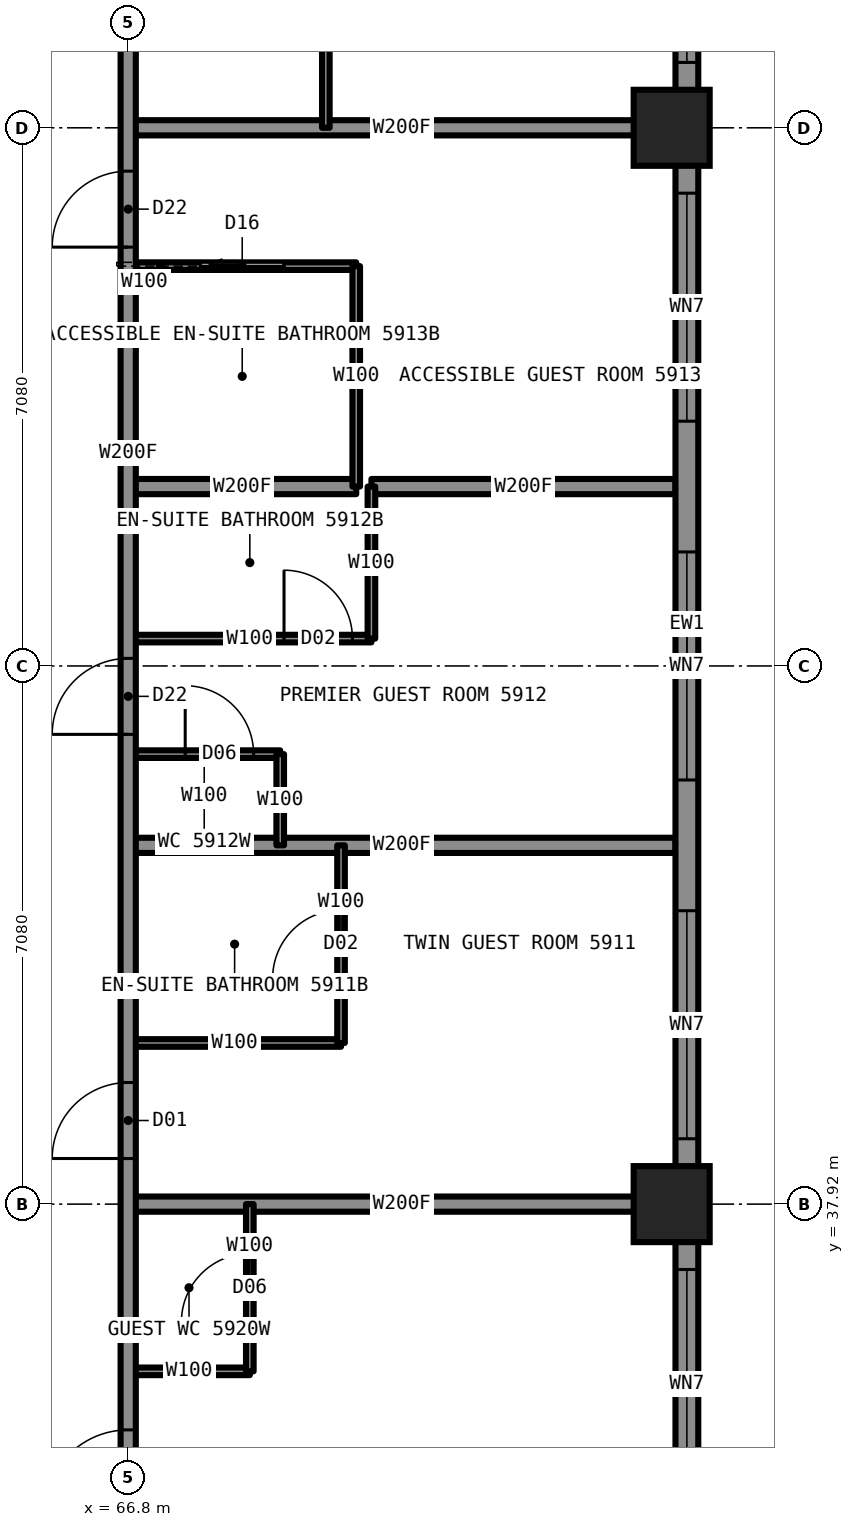
"""IFC4 building model, lengths in metres.
Left out: names, types, materials, properties, quantities, classifications, styles, units other than length and angle.
Written with IfcOpenShell. Run it as: python <this file> out.ifc"""

import sys

from ifc_helpers import new_model, si_unit, direction, frame, frame_2d, origin, origin_2d, place, context, subcontext, project, spatial, rectangle, i_section, extrude, element, fill, save


model = new_model("IFC4")
c1 = context("Model", 3, precision=1e-05, world=origin(), true_north=direction((0.0, 1.0)))
c2 = subcontext(c1, "Body", "Model", "MODEL_VIEW")
j1 = project(units=[si_unit("LENGTHUNIT", "METRE"), si_unit("PLANEANGLEUNIT", "RADIAN")], contexts=[c1])
p1 = place(None, origin())
s1 = spatial("IfcSite", under=j1, at=p1, CompositionType="ELEMENT")
p2 = place(p1, origin())
s2 = spatial("IfcBuilding", under=s1, at=p2, CompositionType="ELEMENT")
p3 = place(p2, frame((0.0, 0.0, 214.3)))
s3 = spatial("IfcBuildingStorey", under=s2, at=p3, CompositionType="ELEMENT", Elevation=214.3)
for number, where, z_axis, x_axis in (
    (1, (73.95, 37.92, 0.0), (0.0, 0.0, 1.0), (1.0, 0.0, 0.0)),
    (2, (73.95, 52.08, 0.0), (0.0, 0.0, 1.0), (1.0, 0.0, 0.0)),
):
    element("IfcColumn", number, at=place(p3, frame(where, z_axis=z_axis, x_axis=x_axis)), inside=s3, PredefinedType="COLUMN", context=c2, shape_type="SweptSolid", body=[
        extrude(i_section(OverallWidth=0.411, OverallDepth=0.434, WebThickness=0.036, FlangeThickness=0.057, at=origin_2d()), origin(), (0.0, 0.0, 1.0), 3.5),
    ])
p4 = place(p3, frame((66.8, 43.84, 0.0), z_axis=(0.0, 0.0, 1.0), x_axis=(1.0, 0.0, 0.0)))
e3 = element("IfcWall", 3, at=p4, inside=s3, PredefinedType="PARTITIONING", context=c2, shape_type="SweptSolid", body=[
    extrude(rectangle(XDim=2.0, YDim=0.1, at=frame_2d((1.0, 0.0))), origin(), (0.0, 0.0, 1.0), 3.33),
])
p5 = place(p4, frame((0.75, 0.0, 0.0)))
e4 = element("IfcOpeningElement", 4, at=p5, cuts=e3, PredefinedType="OPENING", context=c2, shape_type="SweptSolid", body=[
    extrude(rectangle(XDim=0.9, YDim=2.1, at=frame_2d((0.45, 1.05))), frame((0.0, 0.06, 0.0), z_axis=(0.0, -1.0, 0.0), x_axis=(1.0, 0.0, 0.0)), (0.0, 0.0, 1.0), 0.12),
])
p6 = place(p3, frame((66.8, 42.64, 0.0), z_axis=(0.0, 0.0, 1.0), x_axis=(1.0, 0.0, 0.0)))
e5 = element("IfcWall", 5, at=p6, inside=s3, PredefinedType="PARTITIONING", context=c2, shape_type="SweptSolid", body=[
    extrude(rectangle(XDim=7.2, YDim=0.2, at=frame_2d((3.6, 0.0))), origin(), (0.0, 0.0, 1.0), 2.73),
])
p7 = place(p3, frame((66.8, 40.04, 0.0), z_axis=(0.0, 0.0, 1.0), x_axis=(1.0, 0.0, 0.0)))
e6 = element("IfcWall", 6, at=p7, inside=s3, PredefinedType="PARTITIONING", context=c2, shape_type="SweptSolid", body=[
    extrude(rectangle(XDim=2.8, YDim=0.1, at=frame_2d((1.4, 0.0))), origin(), (0.0, 0.0, 1.0), 3.33),
])
p8 = place(p3, frame((66.8, 37.92, 0.0), z_axis=(0.0, 0.0, 1.0), x_axis=(1.0, 0.0, 0.0)))
e7 = element("IfcWall", 7, at=p8, inside=s3, PredefinedType="PARTITIONING", context=c2, shape_type="SweptSolid", body=[
    extrude(rectangle(XDim=7.2, YDim=0.2, at=frame_2d((3.6, 0.0))), origin(), (0.0, 0.0, 1.0), 2.573),
])
p9 = place(p3, frame((66.8, 35.72, 0.0), z_axis=(0.0, 0.0, 1.0), x_axis=(1.0, 0.0, 0.0)))
e8 = element("IfcWall", 8, at=p9, inside=s3, PredefinedType="PARTITIONING", context=c2, shape_type="SweptSolid", body=[
    extrude(rectangle(XDim=1.6, YDim=0.1, at=frame_2d((0.8, 0.0))), origin(), (0.0, 0.0, 1.0), 3.33),
])
p10 = place(p3, frame((66.8, 45.36, 0.0), z_axis=(0.0, 0.0, 1.0), x_axis=(1.0, 0.0, 0.0)))
e9 = element("IfcWall", 9, at=p10, inside=s3, PredefinedType="PARTITIONING", context=c2, shape_type="SweptSolid", body=[
    extrude(rectangle(XDim=3.2, YDim=0.1, at=frame_2d((1.6, 0.0))), origin(), (0.0, 0.0, 1.0), 3.33),
])
p11 = place(p10, frame((2.05, 0.0, 0.0)))
e10 = element("IfcOpeningElement", 10, at=p11, cuts=e9, PredefinedType="OPENING", context=c2, shape_type="SweptSolid", body=[
    extrude(rectangle(XDim=0.9, YDim=2.1, at=frame_2d((0.45, 1.05))), frame((0.0, 0.06, 0.0), z_axis=(0.0, -1.0, 0.0), x_axis=(1.0, 0.0, 0.0)), (0.0, 0.0, 1.0), 0.12),
])
p12 = place(p3, frame((66.8, 47.36, 0.0), z_axis=(0.0, 0.0, 1.0), x_axis=(1.0, 0.0, 0.0)))
e11 = element("IfcWall", 11, at=p12, inside=s3, PredefinedType="PARTITIONING", context=c2, shape_type="SweptSolid", body=[
    extrude(rectangle(XDim=3.0, YDim=0.2, at=frame_2d((1.5, 0.0))), origin(), (0.0, 0.0, 1.0), 2.73),
])
p13 = place(p3, frame((70.0, 47.36, 0.0), z_axis=(0.0, 0.0, 1.0), x_axis=(1.0, 0.0, 0.0)))
e12 = element("IfcWall", 12, at=p13, inside=s3, PredefinedType="PARTITIONING", context=c2, shape_type="SweptSolid", body=[
    extrude(rectangle(XDim=4.0, YDim=0.2, at=frame_2d((2.0, 0.0))), origin(), (0.0, 0.0, 1.0), 2.73),
])
p14 = place(p3, frame((66.8, 50.26, 0.0), z_axis=(0.0, 0.0, 1.0), x_axis=(1.0, 0.0, 0.0)))
e13 = element("IfcWall", 13, at=p14, inside=s3, PredefinedType="PARTITIONING", context=c2, shape_type="SweptSolid", body=[
    extrude(rectangle(XDim=3.0, YDim=0.1, at=frame_2d((1.5, 0.0))), origin(), (0.0, 0.0, 1.0), 3.33),
])
p15 = place(p14, frame((0.95, 0.0, 0.0)))
e14 = element("IfcOpeningElement", 14, at=p15, cuts=e13, PredefinedType="OPENING", context=c2, shape_type="SweptSolid", body=[
    extrude(rectangle(XDim=1.1, YDim=2.1, at=frame_2d((0.55, 1.05))), frame((0.0, 0.06, 0.0), z_axis=(0.0, -1.0, 0.0), x_axis=(1.0, 0.0, 0.0)), (0.0, 0.0, 1.0), 0.12),
])
p16 = place(p3, frame((66.8, 52.08, 0.0), z_axis=(0.0, 0.0, 1.0), x_axis=(1.0, 0.0, 0.0)))
e15 = element("IfcWall", 15, at=p16, inside=s3, PredefinedType="PARTITIONING", context=c2, shape_type="SweptSolid", body=[
    extrude(rectangle(XDim=7.2, YDim=0.2, at=frame_2d((3.6, 0.0))), origin(), (0.0, 0.0, 1.0), 2.573),
])
p17 = place(p3, frame((66.8, 33.2, 0.0), z_axis=(0.0, 0.0, 1.0), x_axis=(0.0, 1.0, 0.0)))
e16 = element("IfcWall", 16, at=p17, inside=s3, PredefinedType="PARTITIONING", context=c2, shape_type="SweptSolid", body=[
    extrude(rectangle(XDim=23.58, YDim=0.2, at=frame_2d((11.79, 0.0))), origin(), (0.0, 0.0, 1.0), 3.33),
])
p18 = place(p17, frame((5.12, 0.0, 0.0)))
e17 = element("IfcOpeningElement", 17, at=p18, cuts=e16, PredefinedType="OPENING", context=c2, shape_type="SweptSolid", body=[
    extrude(rectangle(XDim=1.0, YDim=2.2, at=frame_2d((0.5, 1.1))), frame((0.0, 0.11, 0.0), z_axis=(0.0, -1.0, 0.0), x_axis=(1.0, 0.0, 0.0)), (0.0, 0.0, 1.0), 0.22),
])
p19 = place(p17, frame((10.9, 0.0, 0.0)))
e18 = element("IfcOpeningElement", 18, at=p19, cuts=e16, PredefinedType="OPENING", context=c2, shape_type="SweptSolid", body=[
    extrude(rectangle(XDim=1.0, YDim=2.2, at=frame_2d((0.5, 1.1))), frame((0.0, 0.11, 0.0), z_axis=(0.0, -1.0, 0.0), x_axis=(1.0, 0.0, 0.0)), (0.0, 0.0, 1.0), 0.22),
])
p20 = place(p17, frame((17.31, 0.0, 0.0)))
e19 = element("IfcOpeningElement", 19, at=p20, cuts=e16, PredefinedType="OPENING", context=c2, shape_type="SweptSolid", body=[
    extrude(rectangle(XDim=1.0, YDim=2.2, at=frame_2d((0.5, 1.1))), frame((0.0, 0.11, 0.0), z_axis=(0.0, -1.0, 0.0), x_axis=(1.0, 0.0, 0.0)), (0.0, 0.0, 1.0), 0.22),
])
p21 = place(p17, frame((22.05, 0.0, 0.0)))
e20 = element("IfcOpeningElement", 20, at=p21, cuts=e16, PredefinedType="OPENING", context=c2, shape_type="SweptSolid", body=[
    extrude(rectangle(XDim=1.1, YDim=2.2, at=frame_2d((0.55, 1.1))), frame((0.0, 0.11, 0.0), z_axis=(0.0, -1.0, 0.0), x_axis=(1.0, 0.0, 0.0)), (0.0, 0.0, 1.0), 0.22),
])
p22 = place(p17, frame((0.65, 0.0, 0.0)))
e21 = element("IfcOpeningElement", 21, at=p22, cuts=e16, PredefinedType="OPENING", context=c2, shape_type="SweptSolid", body=[
    extrude(rectangle(XDim=1.1, YDim=2.2, at=frame_2d((0.55, 1.1))), frame((0.0, 0.11, 0.0), z_axis=(0.0, -1.0, 0.0), x_axis=(1.0, 0.0, 0.0)), (0.0, 0.0, 1.0), 0.22),
])
p23 = place(p3, frame((68.4, 35.72, 0.0), z_axis=(0.0, 0.0, 1.0), x_axis=(0.0, 1.0, 0.0)))
e22 = element("IfcWall", 22, at=p23, inside=s3, PredefinedType="PARTITIONING", context=c2, shape_type="SweptSolid", body=[
    extrude(rectangle(XDim=2.2, YDim=0.1, at=frame_2d((1.1, 0.0))), origin(), (0.0, 0.0, 1.0), 3.33),
])
p24 = place(p23, frame((0.65, 0.0, 0.0)))
e23 = element("IfcOpeningElement", 23, at=p24, cuts=e22, PredefinedType="OPENING", context=c2, shape_type="SweptSolid", body=[
    extrude(rectangle(XDim=0.9, YDim=2.1, at=frame_2d((0.45, 1.05))), frame((0.0, 0.06, 0.0), z_axis=(0.0, -1.0, 0.0), x_axis=(1.0, 0.0, 0.0)), (0.0, 0.0, 1.0), 0.12),
])
p25 = place(p3, frame((68.8, 42.64, 0.0), z_axis=(0.0, 0.0, 1.0), x_axis=(0.0, 1.0, 0.0)))
e24 = element("IfcWall", 24, at=p25, inside=s3, PredefinedType="PARTITIONING", context=c2, shape_type="SweptSolid", body=[
    extrude(rectangle(XDim=1.2, YDim=0.1, at=frame_2d((0.6, 0.0))), origin(), (0.0, 0.0, 1.0), 3.33),
])
p26 = place(p3, frame((69.4, 52.08, 0.0), z_axis=(0.0, 0.0, 1.0), x_axis=(0.0, 1.0, 0.0)))
e25 = element("IfcWall", 25, at=p26, inside=s3, PredefinedType="PARTITIONING", context=c2, shape_type="SweptSolid", body=[
    extrude(rectangle(XDim=2.6, YDim=0.1, at=frame_2d((1.3, 0.0))), origin(), (0.0, 0.0, 1.0), 3.33),
])
p27 = place(p3, frame((69.6, 40.04, 0.0), z_axis=(0.0, 0.0, 1.0), x_axis=(0.0, 1.0, 0.0)))
e26 = element("IfcWall", 26, at=p27, inside=s3, PredefinedType="PARTITIONING", context=c2, shape_type="SweptSolid", body=[
    extrude(rectangle(XDim=2.6, YDim=0.1, at=frame_2d((1.3, 0.0))), origin(), (0.0, 0.0, 1.0), 3.33),
])
p28 = place(p27, frame((0.85, 0.0, 0.0)))
e27 = element("IfcOpeningElement", 27, at=p28, cuts=e26, PredefinedType="OPENING", context=c2, shape_type="SweptSolid", body=[
    extrude(rectangle(XDim=0.9, YDim=2.1, at=frame_2d((0.45, 1.05))), frame((0.0, 0.06, 0.0), z_axis=(0.0, -1.0, 0.0), x_axis=(1.0, 0.0, 0.0)), (0.0, 0.0, 1.0), 0.12),
])
p29 = place(p3, frame((69.8, 47.36, 0.0), z_axis=(0.0, 0.0, 1.0), x_axis=(0.0, 1.0, 0.0)))
e28 = element("IfcWall", 28, at=p29, inside=s3, PredefinedType="PARTITIONING", context=c2, shape_type="SweptSolid", body=[
    extrude(rectangle(XDim=2.9, YDim=0.1, at=frame_2d((1.45, 0.0))), origin(), (0.0, 0.0, 1.0), 3.33),
])
p30 = place(p3, frame((70.0, 45.36, 0.0), z_axis=(0.0, 0.0, 1.0), x_axis=(0.0, 1.0, 0.0)))
e29 = element("IfcWall", 29, at=p30, inside=s3, PredefinedType="PARTITIONING", context=c2, shape_type="SweptSolid", body=[
    extrude(rectangle(XDim=2.0, YDim=0.1, at=frame_2d((1.0, 0.0))), origin(), (0.0, 0.0, 1.0), 3.33),
])
p31 = place(p3, frame((74.15, 31.2, 0.0), z_axis=(0.0, 0.0, 1.0), x_axis=(0.0, 1.0, 0.0)))
e30 = element("IfcWall", 30, at=p31, inside=s3, PredefinedType="SOLIDWALL", context=c2, shape_type="SweptSolid", body=[
    extrude(rectangle(XDim=27.6, YDim=0.3, at=frame_2d((13.8, 0.0))), origin(), (0.0, 0.0, 1.0), 2.63),
])
p32 = place(p31, frame((2.86, 0.0, 0.3)))
e31 = element("IfcOpeningElement", 31, at=p32, cuts=e30, PredefinedType="OPENING", context=c2, shape_type="SweptSolid", body=[
    extrude(rectangle(XDim=3.0, YDim=2.0, at=frame_2d((1.5, 1.0))), frame((0.0, 0.16, 0.0), z_axis=(0.0, -1.0, 0.0), x_axis=(1.0, 0.0, 0.0)), (0.0, 0.0, 1.0), 0.32),
])
p33 = place(p31, frame((7.58, 0.0, 0.3)))
e32 = element("IfcOpeningElement", 32, at=p33, cuts=e30, PredefinedType="OPENING", context=c2, shape_type="SweptSolid", body=[
    extrude(rectangle(XDim=3.0, YDim=2.0, at=frame_2d((1.5, 1.0))), frame((0.0, 0.16, 0.0), z_axis=(0.0, -1.0, 0.0), x_axis=(1.0, 0.0, 0.0)), (0.0, 0.0, 1.0), 0.32),
])
p34 = place(p31, frame((12.3, 0.0, 0.3)))
e33 = element("IfcOpeningElement", 33, at=p34, cuts=e30, PredefinedType="OPENING", context=c2, shape_type="SweptSolid", body=[
    extrude(rectangle(XDim=3.0, YDim=2.0, at=frame_2d((1.5, 1.0))), frame((0.0, 0.16, 0.0), z_axis=(0.0, -1.0, 0.0), x_axis=(1.0, 0.0, 0.0)), (0.0, 0.0, 1.0), 0.32),
])
p35 = place(p31, frame((17.02, 0.0, 0.3)))
e34 = element("IfcOpeningElement", 34, at=p35, cuts=e30, PredefinedType="OPENING", context=c2, shape_type="SweptSolid", body=[
    extrude(rectangle(XDim=3.0, YDim=2.0, at=frame_2d((1.5, 1.0))), frame((0.0, 0.16, 0.0), z_axis=(0.0, -1.0, 0.0), x_axis=(1.0, 0.0, 0.0)), (0.0, 0.0, 1.0), 0.32),
])
p36 = place(p31, frame((21.74, 0.0, 0.3)))
e35 = element("IfcOpeningElement", 35, at=p36, cuts=e30, PredefinedType="OPENING", context=c2, shape_type="SweptSolid", body=[
    extrude(rectangle(XDim=3.0, YDim=2.0, at=frame_2d((1.5, 1.0))), frame((0.0, 0.16, 0.0), z_axis=(0.0, -1.0, 0.0), x_axis=(1.0, 0.0, 0.0)), (0.0, 0.0, 1.0), 0.32),
])
p37 = place(p18, origin())
e36 = element("IfcDoor", 36, at=p37, inside=s3, OperationType="SINGLE_SWING_LEFT", PredefinedType="DOOR", context=c2, shape_type="SweptSolid", body=[
    extrude(rectangle(XDim=1.0, YDim=2.2, at=frame_2d((0.5, 1.1))), frame((0.0, 0.025, 0.0), z_axis=(0.0, -1.0, 0.0), x_axis=(1.0, 0.0, 0.0)), (0.0, 0.0, 1.0), 0.05),
])
fill(e17, e36)
p38 = place(p28, origin())
e37 = element("IfcDoor", 37, at=p38, inside=s3, OperationType="SINGLE_SWING_RIGHT", PredefinedType="DOOR", context=c2, shape_type="SweptSolid", body=[
    extrude(rectangle(XDim=0.9, YDim=2.1, at=frame_2d((0.45, 1.05))), frame((0.0, 0.025, 0.0), z_axis=(0.0, -1.0, 0.0), x_axis=(1.0, 0.0, 0.0)), (0.0, 0.0, 1.0), 0.05),
])
fill(e27, e37)
p39 = place(p19, origin())
e38 = element("IfcDoor", 38, at=p39, inside=s3, OperationType="SINGLE_SWING_LEFT", PredefinedType="DOOR", context=c2, shape_type="SweptSolid", body=[
    extrude(rectangle(XDim=1.0, YDim=2.2, at=frame_2d((0.5, 1.1))), frame((0.0, 0.025, 0.0), z_axis=(0.0, -1.0, 0.0), x_axis=(1.0, 0.0, 0.0)), (0.0, 0.0, 1.0), 0.05),
])
fill(e18, e38)
p40 = place(p11, origin())
e39 = element("IfcDoor", 39, at=p40, inside=s3, OperationType="SINGLE_SWING_RIGHT", PredefinedType="DOOR", context=c2, shape_type="SweptSolid", body=[
    extrude(rectangle(XDim=0.9, YDim=2.1, at=frame_2d((0.45, 1.05))), frame((0.0, 0.025, 0.0), z_axis=(0.0, -1.0, 0.0), x_axis=(1.0, 0.0, 0.0)), (0.0, 0.0, 1.0), 0.05),
])
fill(e10, e39)
p41 = place(p5, origin())
e40 = element("IfcDoor", 40, at=p41, inside=s3, OperationType="SINGLE_SWING_LEFT", PredefinedType="DOOR", context=c2, shape_type="SweptSolid", body=[
    extrude(rectangle(XDim=0.9, YDim=2.1, at=frame_2d((0.45, 1.05))), frame((0.0, 0.025, 0.0), z_axis=(0.0, -1.0, 0.0), x_axis=(1.0, 0.0, 0.0)), (0.0, 0.0, 1.0), 0.05),
])
fill(e4, e40)
p42 = place(p20, origin())
e41 = element("IfcDoor", 41, at=p42, inside=s3, OperationType="SINGLE_SWING_LEFT", PredefinedType="DOOR", context=c2, shape_type="SweptSolid", body=[
    extrude(rectangle(XDim=1.0, YDim=2.2, at=frame_2d((0.5, 1.1))), frame((0.0, 0.025, 0.0), z_axis=(0.0, -1.0, 0.0), x_axis=(1.0, 0.0, 0.0)), (0.0, 0.0, 1.0), 0.05),
])
fill(e19, e41)
p43 = place(p15, origin())
e42 = element("IfcDoor", 42, at=p43, inside=s3, OperationType="SLIDING_TO_LEFT", PredefinedType="DOOR", context=c2, shape_type="SweptSolid", body=[
    extrude(rectangle(XDim=1.1, YDim=2.1, at=frame_2d((0.55, 1.05))), frame((0.0, 0.025, 0.0), z_axis=(0.0, -1.0, 0.0), x_axis=(1.0, 0.0, 0.0)), (0.0, 0.0, 1.0), 0.05),
])
fill(e14, e42)
p44 = place(p22, origin())
e43 = element("IfcDoor", 43, at=p44, inside=s3, OperationType="SINGLE_SWING_LEFT", PredefinedType="DOOR", context=c2, shape_type="SweptSolid", body=[
    extrude(rectangle(XDim=1.1, YDim=2.2, at=frame_2d((0.55, 1.1))), frame((0.0, 0.025, 0.0), z_axis=(0.0, -1.0, 0.0), x_axis=(1.0, 0.0, 0.0)), (0.0, 0.0, 1.0), 0.05),
])
fill(e21, e43)
p45 = place(p24, origin())
e44 = element("IfcDoor", 44, at=p45, inside=s3, OperationType="SINGLE_SWING_LEFT", PredefinedType="DOOR", context=c2, shape_type="SweptSolid", body=[
    extrude(rectangle(XDim=0.9, YDim=2.1, at=frame_2d((0.45, 1.05))), frame((0.0, 0.025, 0.0), z_axis=(0.0, -1.0, 0.0), x_axis=(1.0, 0.0, 0.0)), (0.0, 0.0, 1.0), 0.05),
])
fill(e23, e44)
p46 = place(p32, origin())
e45 = element("IfcWindow", 45, at=p46, inside=s3, PartitioningType="SINGLE_PANEL", PredefinedType="WINDOW", context=c2, shape_type="SweptSolid", body=[
    extrude(rectangle(XDim=3.0, YDim=2.0, at=frame_2d((1.5, 1.0))), frame((0.0, 0.13, 0.0), z_axis=(0.0, -1.0, 0.0), x_axis=(1.0, 0.0, 0.0)), (0.0, 0.0, 1.0), 0.06),
])
fill(e31, e45)
p47 = place(p33, origin())
e46 = element("IfcWindow", 46, at=p47, inside=s3, PartitioningType="SINGLE_PANEL", PredefinedType="WINDOW", context=c2, shape_type="SweptSolid", body=[
    extrude(rectangle(XDim=3.0, YDim=2.0, at=frame_2d((1.5, 1.0))), frame((0.0, 0.13, 0.0), z_axis=(0.0, -1.0, 0.0), x_axis=(1.0, 0.0, 0.0)), (0.0, 0.0, 1.0), 0.06),
])
fill(e32, e46)
p48 = place(p34, origin())
e47 = element("IfcWindow", 47, at=p48, inside=s3, PartitioningType="SINGLE_PANEL", PredefinedType="WINDOW", context=c2, shape_type="SweptSolid", body=[
    extrude(rectangle(XDim=3.0, YDim=2.0, at=frame_2d((1.5, 1.0))), frame((0.0, 0.13, 0.0), z_axis=(0.0, -1.0, 0.0), x_axis=(1.0, 0.0, 0.0)), (0.0, 0.0, 1.0), 0.06),
])
fill(e33, e47)
p49 = place(p35, origin())
e48 = element("IfcWindow", 48, at=p49, inside=s3, PartitioningType="SINGLE_PANEL", PredefinedType="WINDOW", context=c2, shape_type="SweptSolid", body=[
    extrude(rectangle(XDim=3.0, YDim=2.0, at=frame_2d((1.5, 1.0))), frame((0.0, 0.13, 0.0), z_axis=(0.0, -1.0, 0.0), x_axis=(1.0, 0.0, 0.0)), (0.0, 0.0, 1.0), 0.06),
])
fill(e34, e48)
p50 = place(p36, origin())
e49 = element("IfcWindow", 49, at=p50, inside=s3, PartitioningType="SINGLE_PANEL", PredefinedType="WINDOW", context=c2, shape_type="SweptSolid", body=[
    extrude(rectangle(XDim=3.0, YDim=2.0, at=frame_2d((1.5, 1.0))), frame((0.0, 0.13, 0.0), z_axis=(0.0, -1.0, 0.0), x_axis=(1.0, 0.0, 0.0)), (0.0, 0.0, 1.0), 0.06),
])
fill(e35, e49)
save(model, sys.argv[1])
